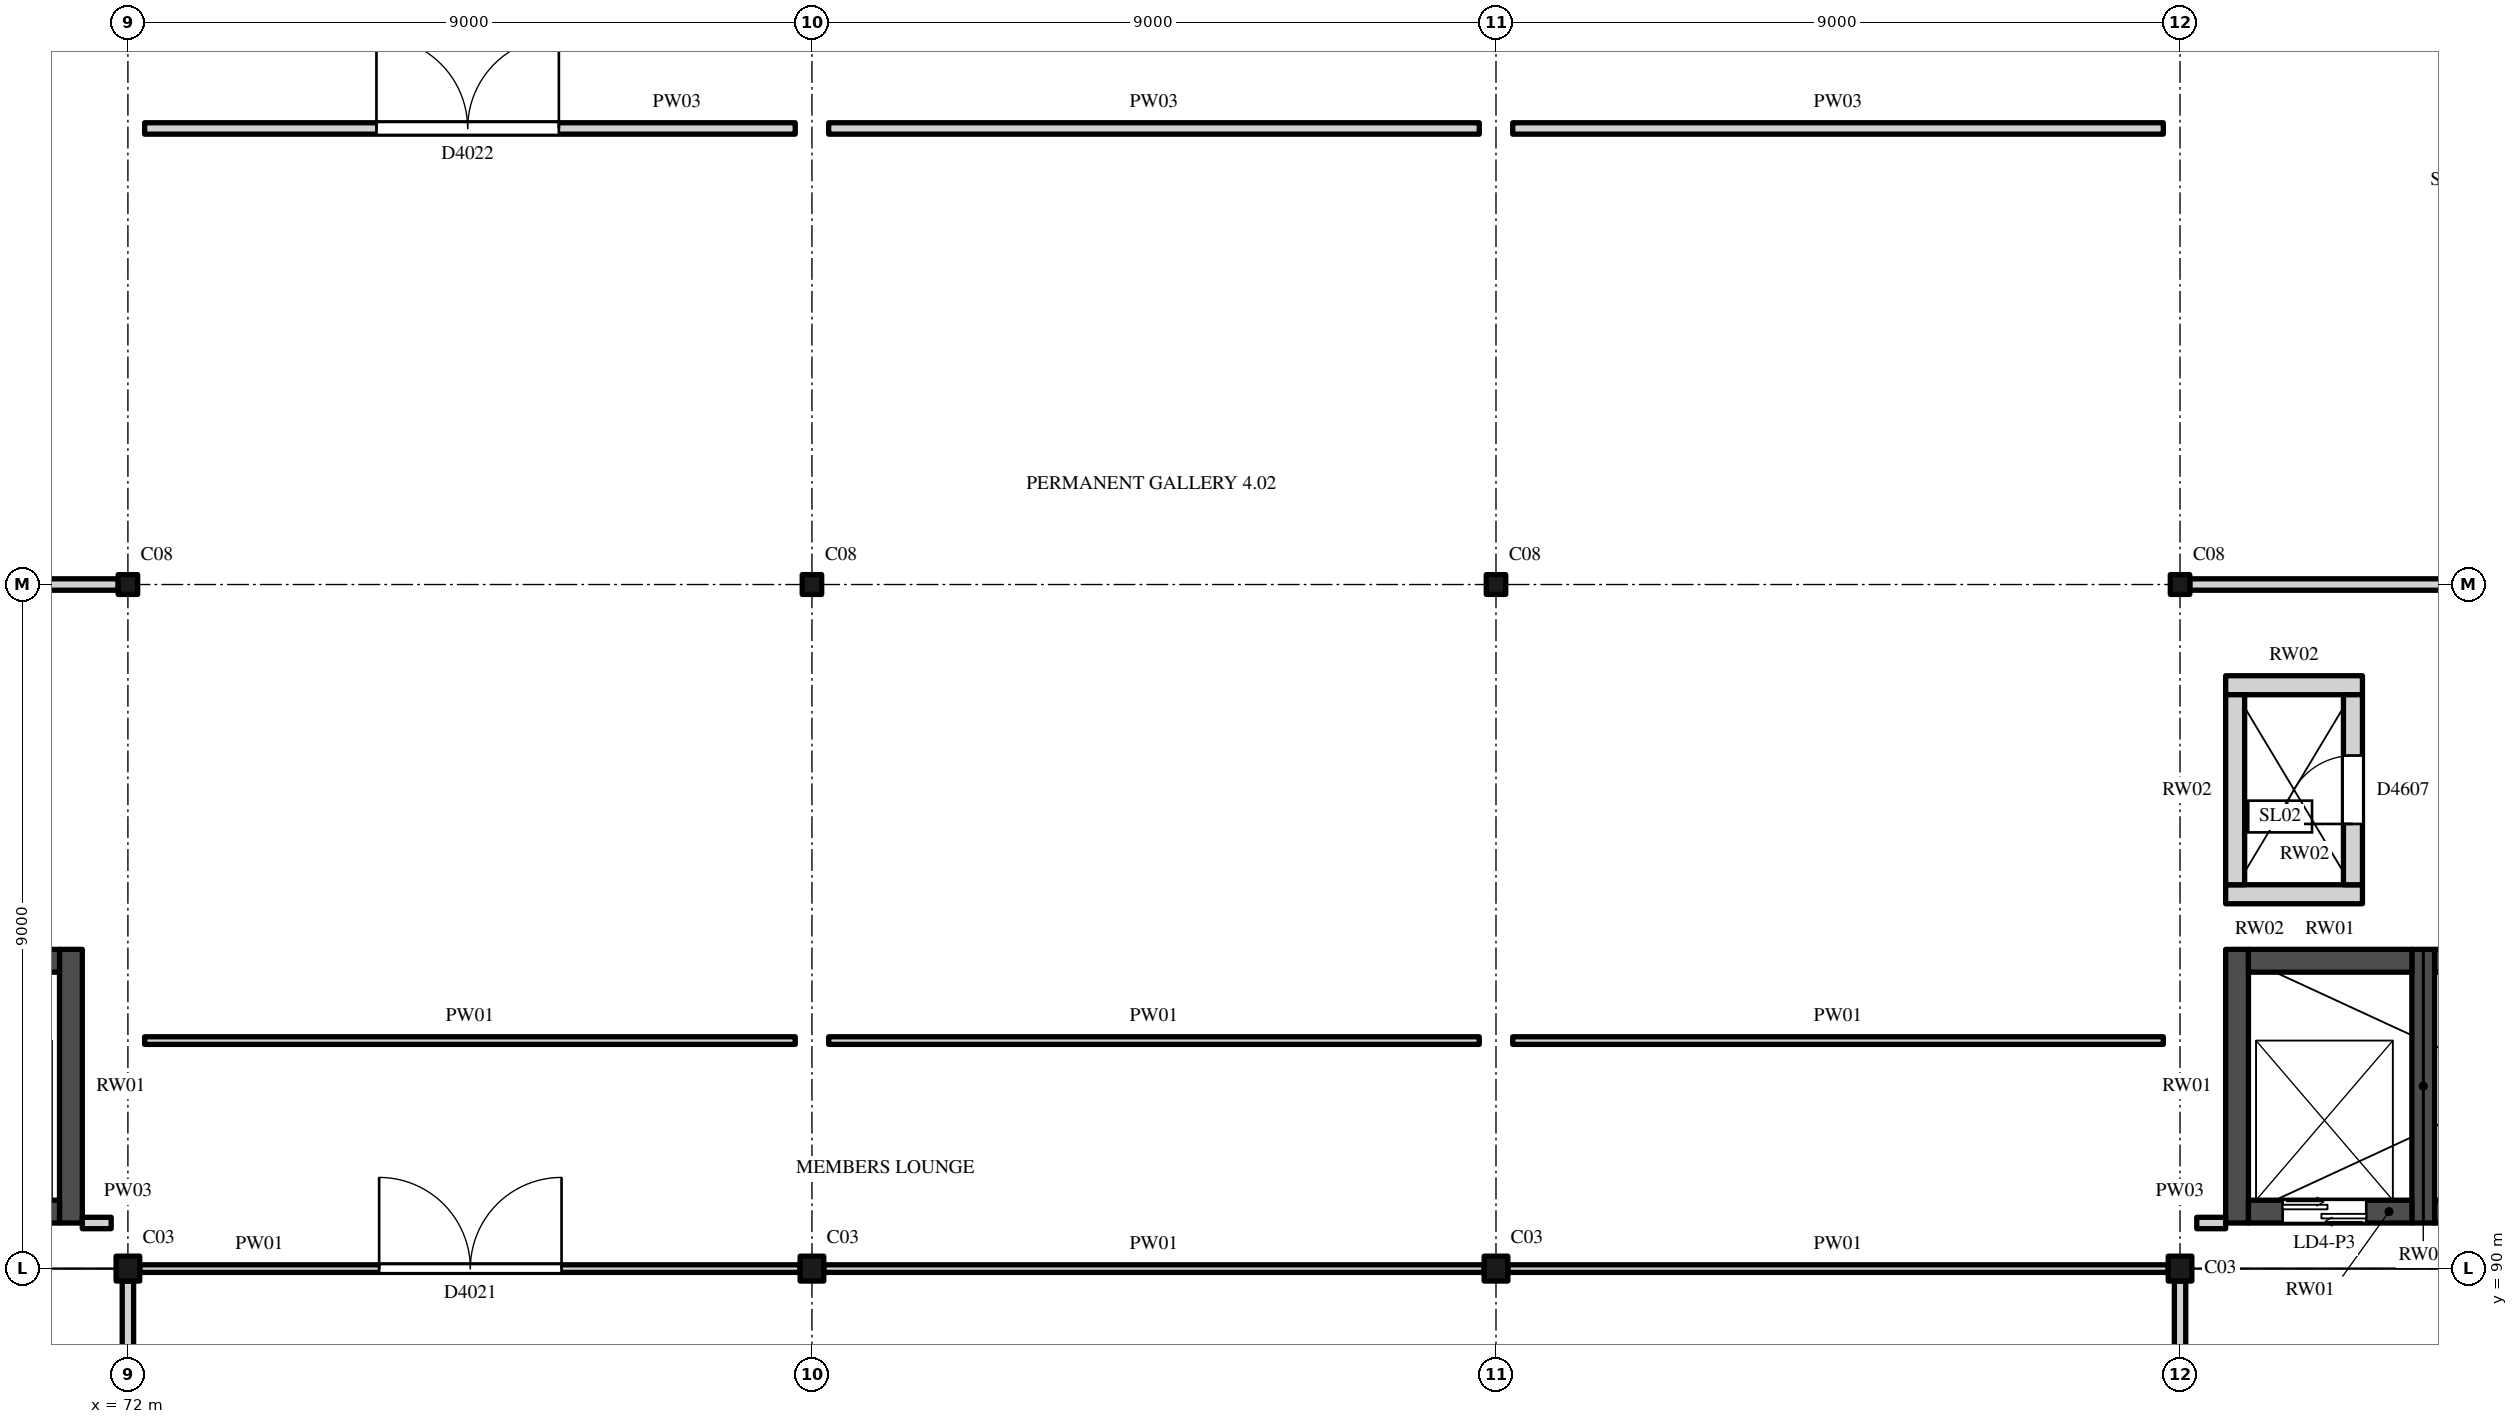
"""IFC4 building model, lengths in metres.
Left out: names, types, materials, properties, quantities, classifications, styles, units other than length and angle.
Written with IfcOpenShell. Run it as: python <this file> out.ifc"""

import sys

from ifc_helpers import new_model, si_unit, direction, frame, frame_2d, origin, origin_2d, place, context, subcontext, project, spatial, rectangle, i_section, extrude, element, fill, save


model = new_model("IFC4")
c1 = context("Model", 3, precision=1e-05, world=origin(), true_north=direction((0.0, 1.0)))
c2 = subcontext(c1, "Body", "Model", "MODEL_VIEW")
j1 = project(units=[si_unit("LENGTHUNIT", "METRE"), si_unit("PLANEANGLEUNIT", "RADIAN")], contexts=[c1])
p1 = place(None, origin())
s1 = spatial("IfcSite", under=j1, at=p1, CompositionType="ELEMENT")
p2 = place(p1, origin())
s2 = spatial("IfcBuilding", under=s1, at=p2, CompositionType="ELEMENT")
p3 = place(p2, frame((0.0, 0.0, 26.0)))
s3 = spatial("IfcBuildingStorey", under=s2, at=p3, CompositionType="ELEMENT", Elevation=26.0)
for number, where, z_axis, x_axis in (
    (1, (72.0, 90.0, 0.0), (0.0, 0.0, 1.0), (1.0, 0.0, 0.0)),
    (2, (81.0, 90.0, 0.0), (0.0, 0.0, 1.0), (1.0, 0.0, 0.0)),
    (3, (90.0, 90.0, 0.0), (0.0, 0.0, 1.0), (1.0, 0.0, 0.0)),
    (4, (99.0, 90.0, 0.0), (0.0, 0.0, 1.0), (1.0, 0.0, 0.0)),
):
    element("IfcColumn", number, at=place(p3, frame(where, z_axis=z_axis, x_axis=x_axis)), inside=s3, PredefinedType="COLUMN", context=c2, shape_type="SweptSolid", body=[
        extrude(i_section(OverallWidth=0.311, OverallDepth=0.327, WebThickness=0.016, FlangeThickness=0.025, FilletRadius=0.017, at=origin_2d()), origin(), (0.0, 0.0, 1.0), 5.0),
    ])
for number, where, z_axis, x_axis in (
    (5, (72.0, 99.0, 0.0), (0.0, 0.0, 1.0), (1.0, 0.0, 0.0)),
    (6, (81.0, 99.0, 0.0), (0.0, 0.0, 1.0), (1.0, 0.0, 0.0)),
    (7, (90.0, 99.0, 0.0), (0.0, 0.0, 1.0), (1.0, 0.0, 0.0)),
    (8, (99.0, 99.0, 0.0), (0.0, 0.0, 1.0), (1.0, 0.0, 0.0)),
):
    element("IfcColumn", number, at=place(p3, frame(where, z_axis=z_axis, x_axis=x_axis)), inside=s3, PredefinedType="COLUMN", context=c2, shape_type="SweptSolid", body=[
        extrude(i_section(OverallWidth=0.256, OverallDepth=0.26, WebThickness=0.01, FlangeThickness=0.017, FilletRadius=0.014, at=origin_2d()), origin(), (0.0, 0.0, 1.0), 5.0),
    ])
p4 = place(p3, frame((71.25, 90.6, 0.0), z_axis=(0.0, 0.0, 1.0), x_axis=(0.0, 1.0, 0.0)))
e9 = element("IfcWall", 9, at=p4, inside=s3, PredefinedType="SHEAR", context=c2, shape_type="SweptSolid", body=[
    extrude(rectangle(XDim=3.6, YDim=0.3, at=frame_2d((1.8, 0.0))), origin(), (0.0, 0.0, 1.0), 5.0),
])
p5 = place(p3, frame((68.95, 90.75, 0.0), z_axis=(0.0, 0.0, 1.0), x_axis=(1.0, 0.0, 0.0)))
e10 = element("IfcWall", 10, at=p5, inside=s3, PredefinedType="SHEAR", context=c2, shape_type="SweptSolid", body=[
    extrude(rectangle(XDim=2.15, YDim=0.3, at=frame_2d((1.075, 0.0))), origin(), (0.0, 0.0, 1.0), 5.0),
])
p6 = place(p5, frame((0.6, 0.0, 0.0)))
e11 = element("IfcOpeningElement", 11, at=p6, cuts=e10, PredefinedType="OPENING", context=c2, shape_type="SweptSolid", body=[
    extrude(rectangle(XDim=1.1, YDim=2.1, at=frame_2d((0.55, 1.05))), frame((0.0, 0.16, 0.0), z_axis=(0.0, -1.0, 0.0), x_axis=(1.0, 0.0, 0.0)), (0.0, 0.0, 1.0), 0.32),
])
p7 = place(p3, frame((68.95, 94.05, 0.0), z_axis=(0.0, 0.0, 1.0), x_axis=(1.0, 0.0, 0.0)))
e12 = element("IfcWall", 12, at=p7, inside=s3, PredefinedType="SHEAR", context=c2, shape_type="SweptSolid", body=[
    extrude(rectangle(XDim=2.15, YDim=0.3, at=frame_2d((1.075, 0.0))), origin(), (0.0, 0.0, 1.0), 5.0),
])
for number, where, z_axis, x_axis in (
    (13, (99.75, 90.6, 0.0), (0.0, 0.0, 1.0), (0.0, 1.0, 0.0)),
    (14, (102.2, 90.6, 0.0), (0.0, 0.0, 1.0), (0.0, 1.0, 0.0)),
):
    element("IfcWall", number, at=place(p3, frame(where, z_axis=z_axis, x_axis=x_axis)), inside=s3, PredefinedType="SHEAR", context=c2, shape_type="SweptSolid", body=[
        extrude(rectangle(XDim=3.6, YDim=0.3, at=frame_2d((1.8, 0.0))), origin(), (0.0, 0.0, 1.0), 5.0),
    ])
p8 = place(p3, frame((99.9, 90.75, 0.0), z_axis=(0.0, 0.0, 1.0), x_axis=(1.0, 0.0, 0.0)))
e15 = element("IfcWall", 15, at=p8, inside=s3, PredefinedType="SHEAR", context=c2, shape_type="SweptSolid", body=[
    extrude(rectangle(XDim=2.15, YDim=0.3, at=frame_2d((1.075, 0.0))), origin(), (0.0, 0.0, 1.0), 5.0),
])
p9 = place(p8, frame((0.45, 0.0, 0.0)))
e16 = element("IfcOpeningElement", 16, at=p9, cuts=e15, PredefinedType="OPENING", context=c2, shape_type="SweptSolid", body=[
    extrude(rectangle(XDim=1.1, YDim=2.1, at=frame_2d((0.55, 1.05))), frame((0.0, 0.16, 0.0), z_axis=(0.0, -1.0, 0.0), x_axis=(1.0, 0.0, 0.0)), (0.0, 0.0, 1.0), 0.32),
])
p10 = place(p3, frame((99.9, 94.05, 0.0), z_axis=(0.0, 0.0, 1.0), x_axis=(1.0, 0.0, 0.0)))
e17 = element("IfcWall", 17, at=p10, inside=s3, PredefinedType="SHEAR", context=c2, shape_type="SweptSolid", body=[
    extrude(rectangle(XDim=2.15, YDim=0.3, at=frame_2d((1.075, 0.0))), origin(), (0.0, 0.0, 1.0), 5.0),
])
p11 = place(p3, frame((102.35, 90.75, 0.0), z_axis=(0.0, 0.0, 1.0), x_axis=(1.0, 0.0, 0.0)))
e18 = element("IfcWall", 18, at=p11, inside=s3, PredefinedType="SHEAR", context=c2, shape_type="SweptSolid", body=[
    extrude(rectangle(XDim=2.3, YDim=0.3, at=frame_2d((1.15, 0.0))), origin(), (0.0, 0.0, 1.0), 5.0),
])
p12 = place(p11, frame((0.6, 0.0, 0.0)))
e19 = element("IfcOpeningElement", 19, at=p12, cuts=e18, PredefinedType="OPENING", context=c2, shape_type="SweptSolid", body=[
    extrude(rectangle(XDim=1.1, YDim=2.1, at=frame_2d((0.55, 1.05))), frame((0.0, 0.16, 0.0), z_axis=(0.0, -1.0, 0.0), x_axis=(1.0, 0.0, 0.0)), (0.0, 0.0, 1.0), 0.32),
])
p13 = place(p3, frame((102.35, 94.05, 0.0), z_axis=(0.0, 0.0, 1.0), x_axis=(1.0, 0.0, 0.0)))
e20 = element("IfcWall", 20, at=p13, inside=s3, PredefinedType="SHEAR", context=c2, shape_type="SweptSolid", body=[
    extrude(rectangle(XDim=2.3, YDim=0.3, at=frame_2d((1.15, 0.0))), origin(), (0.0, 0.0, 1.0), 5.0),
])
for number, where, z_axis, x_axis in (
    (21, (99.6, 94.925, 0.0), (0.0, 0.0, 1.0), (1.0, 0.0, 0.0)),
    (22, (99.6, 97.675, 0.0), (0.0, 0.0, 1.0), (1.0, 0.0, 0.0)),
):
    element("IfcWall", number, at=place(p3, frame(where, z_axis=z_axis, x_axis=x_axis)), inside=s3, PredefinedType="STANDARD", context=c2, shape_type="SweptSolid", body=[
        extrude(rectangle(XDim=1.8, YDim=0.25, at=frame_2d((0.9, 0.0))), origin(), (0.0, 0.0, 1.0), 5.0),
    ])
p14 = place(p3, frame((99.725, 95.05, 0.0), z_axis=(0.0, 0.0, 1.0), x_axis=(0.0, 1.0, 0.0)))
e23 = element("IfcWall", 23, at=p14, inside=s3, PredefinedType="STANDARD", context=c2, shape_type="SweptSolid", body=[
    extrude(rectangle(XDim=2.5, YDim=0.25, at=frame_2d((1.25, 0.0))), origin(), (0.0, 0.0, 1.0), 5.0),
])
p15 = place(p3, frame((101.275, 95.05, 0.0), z_axis=(0.0, 0.0, 1.0), x_axis=(0.0, 1.0, 0.0)))
e24 = element("IfcWall", 24, at=p15, inside=s3, PredefinedType="STANDARD", context=c2, shape_type="SweptSolid", body=[
    extrude(rectangle(XDim=2.5, YDim=0.25, at=frame_2d((1.25, 0.0))), origin(), (0.0, 0.0, 1.0), 5.0),
])
p16 = place(p15, frame((0.8, 0.0, 0.0)))
e25 = element("IfcOpeningElement", 25, at=p16, cuts=e24, PredefinedType="OPENING", context=c2, shape_type="SweptSolid", body=[
    extrude(rectangle(XDim=0.9, YDim=2.1, at=frame_2d((0.45, 1.05))), frame((0.0, 0.135, 0.0), z_axis=(0.0, -1.0, 0.0), x_axis=(1.0, 0.0, 0.0)), (0.0, 0.0, 1.0), 0.27),
])
p17 = place(p3, frame((72.156, 90.0, 0.0), z_axis=(0.0, 0.0, 1.0), x_axis=(1.0, 0.0, 0.0)))
e26 = element("IfcWall", 26, at=p17, inside=s3, PredefinedType="PARTITIONING", context=c2, shape_type="SweptSolid", body=[
    extrude(rectangle(XDim=8.689, YDim=0.1, at=frame_2d((4.344, 0.0))), origin(), (0.0, 0.0, 1.0), 4.518),
])
p18 = place(p17, frame((3.15, 0.0, 0.0)))
e27 = element("IfcOpeningElement", 27, at=p18, cuts=e26, PredefinedType="OPENING", context=c2, shape_type="SweptSolid", body=[
    extrude(rectangle(XDim=2.4, YDim=2.4, at=frame_2d((1.2, 1.2))), frame((0.0, 0.06, 0.0), z_axis=(0.0, -1.0, 0.0), x_axis=(1.0, 0.0, 0.0)), (0.0, 0.0, 1.0), 0.12),
])
for number, where, z_axis, x_axis in (
    (28, (81.156, 90.0, 0.0), (0.0, 0.0, 1.0), (1.0, 0.0, 0.0)),
    (29, (90.156, 90.0, 0.0), (0.0, 0.0, 1.0), (1.0, 0.0, 0.0)),
):
    element("IfcWall", number, at=place(p3, frame(where, z_axis=z_axis, x_axis=x_axis)), inside=s3, PredefinedType="PARTITIONING", context=c2, shape_type="SweptSolid", body=[
        extrude(rectangle(XDim=8.689, YDim=0.1, at=frame_2d((4.344, 0.0))), origin(), (0.0, 0.0, 1.0), 4.518),
    ])
for number, where, z_axis, x_axis in (
    (30, (71.4, 90.6, 0.0), (0.0, 0.0, 1.0), (1.0, 0.0, 0.0)),
    (31, (99.22, 90.6, 0.0), (0.0, 0.0, 1.0), (1.0, 0.0, 0.0)),
):
    element("IfcWall", number, at=place(p3, frame(where, z_axis=z_axis, x_axis=x_axis)), inside=s3, PredefinedType="PARTITIONING", context=c2, shape_type="SweptSolid", body=[
        extrude(rectangle(XDim=0.38, YDim=0.15, at=frame_2d((0.19, 0.0))), origin(), (0.0, 0.0, 1.0), 4.825),
    ])
for number, where, z_axis, x_axis in (
    (32, (72.22, 93.0, 0.0), (0.0, 0.0, 1.0), (1.0, 0.0, 0.0)),
    (33, (81.22, 93.0, 0.0), (0.0, 0.0, 1.0), (1.0, 0.0, 0.0)),
    (34, (90.22, 93.0, 0.0), (0.0, 0.0, 1.0), (1.0, 0.0, 0.0)),
):
    element("IfcWall", number, at=place(p3, frame(where, z_axis=z_axis, x_axis=x_axis)), inside=s3, PredefinedType="PARTITIONING", context=c2, shape_type="SweptSolid", body=[
        extrude(rectangle(XDim=8.56, YDim=0.1, at=frame_2d((4.28, 0.0))), origin(), (0.0, 0.0, 1.0), 4.521),
    ])
p19 = place(p3, frame((63.128, 99.0, 0.0), z_axis=(0.0, 0.0, 1.0), x_axis=(1.0, 0.0, 0.0)))
e35 = element("IfcWall", 35, at=p19, inside=s3, PredefinedType="PARTITIONING", context=c2, shape_type="SweptSolid", body=[
    extrude(rectangle(XDim=8.744, YDim=0.15, at=frame_2d((4.372, 0.0))), origin(), (0.0, 0.0, 1.0), 4.518),
])
p20 = place(p19, frame((3.85, 0.0, 0.0)))
e36 = element("IfcOpeningElement", 36, at=p20, cuts=e35, PredefinedType="OPENING", context=c2, shape_type="SweptSolid", body=[
    extrude(rectangle(XDim=1.0, YDim=2.4, at=frame_2d((0.5, 1.2))), frame((0.0, 0.085, 0.0), z_axis=(0.0, -1.0, 0.0), x_axis=(1.0, 0.0, 0.0)), (0.0, 0.0, 1.0), 0.17),
])
p21 = place(p3, frame((99.128, 99.0, 0.0), z_axis=(0.0, 0.0, 1.0), x_axis=(1.0, 0.0, 0.0)))
e37 = element("IfcWall", 37, at=p21, inside=s3, PredefinedType="PARTITIONING", context=c2, shape_type="SweptSolid", body=[
    extrude(rectangle(XDim=8.744, YDim=0.15, at=frame_2d((4.372, 0.0))), origin(), (0.0, 0.0, 1.0), 4.518),
])
p22 = place(p21, frame((3.85, 0.0, 0.0)))
e38 = element("IfcOpeningElement", 38, at=p22, cuts=e37, PredefinedType="OPENING", context=c2, shape_type="SweptSolid", body=[
    extrude(rectangle(XDim=1.0, YDim=2.4, at=frame_2d((0.5, 1.2))), frame((0.0, 0.085, 0.0), z_axis=(0.0, -1.0, 0.0), x_axis=(1.0, 0.0, 0.0)), (0.0, 0.0, 1.0), 0.17),
])
p23 = place(p3, frame((72.22, 105.0, 0.0), z_axis=(0.0, 0.0, 1.0), x_axis=(1.0, 0.0, 0.0)))
e39 = element("IfcWall", 39, at=p23, inside=s3, PredefinedType="PARTITIONING", context=c2, shape_type="SweptSolid", body=[
    extrude(rectangle(XDim=8.56, YDim=0.15, at=frame_2d((4.28, 0.0))), origin(), (0.0, 0.0, 1.0), 4.521),
])
p24 = place(p23, frame((3.05, 0.0, 0.0)))
e40 = element("IfcOpeningElement", 40, at=p24, cuts=e39, PredefinedType="OPENING", context=c2, shape_type="SweptSolid", body=[
    extrude(rectangle(XDim=2.4, YDim=3.0, at=frame_2d((1.2, 1.5))), frame((0.0, 0.085, 0.0), z_axis=(0.0, -1.0, 0.0), x_axis=(1.0, 0.0, 0.0)), (0.0, 0.0, 1.0), 0.17),
])
for number, where, z_axis, x_axis in (
    (41, (81.22, 105.0, 0.0), (0.0, 0.0, 1.0), (1.0, 0.0, 0.0)),
    (42, (90.22, 105.0, 0.0), (0.0, 0.0, 1.0), (1.0, 0.0, 0.0)),
):
    element("IfcWall", number, at=place(p3, frame(where, z_axis=z_axis, x_axis=x_axis)), inside=s3, PredefinedType="PARTITIONING", context=c2, shape_type="SweptSolid", body=[
        extrude(rectangle(XDim=8.56, YDim=0.15, at=frame_2d((4.28, 0.0))), origin(), (0.0, 0.0, 1.0), 4.521),
    ])
for number, where, z_axis, x_axis in (
    (43, (72.0, 84.075, 0.0), (0.0, 0.0, 1.0), (0.0, 1.0, 0.0)),
    (44, (99.0, 84.075, 0.0), (0.0, 0.0, 1.0), (0.0, 1.0, 0.0)),
):
    element("IfcWall", number, at=place(p3, frame(where, z_axis=z_axis, x_axis=x_axis)), inside=s3, PredefinedType="PARTITIONING", context=c2, shape_type="SweptSolid", body=[
        extrude(rectangle(XDim=5.761, YDim=0.15, at=frame_2d((2.881, 0.0))), origin(), (0.0, 0.0, 1.0), 4.419),
    ])
p25 = place(p9, origin())
e45 = element("IfcDoor", 45, at=p25, inside=s3, OperationType="DOUBLE_DOOR_SLIDING", PredefinedType="DOOR", context=c2, shape_type="SweptSolid", body=[
    extrude(rectangle(XDim=1.1, YDim=2.1, at=frame_2d((0.55, 1.05))), frame((0.0, 0.025, 0.0), z_axis=(0.0, -1.0, 0.0), x_axis=(1.0, 0.0, 0.0)), (0.0, 0.0, 1.0), 0.05),
])
fill(e16, e45)
p26 = place(p16, origin())
e46 = element("IfcDoor", 46, at=p26, inside=s3, OperationType="SINGLE_SWING_RIGHT", PredefinedType="DOOR", context=c2, shape_type="SweptSolid", body=[
    extrude(rectangle(XDim=0.9, YDim=2.1, at=frame_2d((0.45, 1.05))), frame((0.0, 0.025, 0.0), z_axis=(0.0, -1.0, 0.0), x_axis=(1.0, 0.0, 0.0)), (0.0, 0.0, 1.0), 0.05),
])
fill(e25, e46)
p27 = place(p18, origin())
e47 = element("IfcDoor", 47, at=p27, inside=s3, OperationType="DOUBLE_DOOR_SINGLE_SWING", PredefinedType="DOOR", context=c2, shape_type="SweptSolid", body=[
    extrude(rectangle(XDim=2.4, YDim=2.4, at=frame_2d((1.2, 1.2))), frame((0.0, 0.025, 0.0), z_axis=(0.0, -1.0, 0.0), x_axis=(1.0, 0.0, 0.0)), (0.0, 0.0, 1.0), 0.05),
])
fill(e27, e47)
p28 = place(p24, origin())
e48 = element("IfcDoor", 48, at=p28, inside=s3, OperationType="DOUBLE_DOOR_SINGLE_SWING", PredefinedType="DOOR", context=c2, shape_type="SweptSolid", body=[
    extrude(rectangle(XDim=2.4, YDim=3.0, at=frame_2d((1.2, 1.5))), frame((0.0, 0.025, 0.0), z_axis=(0.0, -1.0, 0.0), x_axis=(1.0, 0.0, 0.0)), (0.0, 0.0, 1.0), 0.05),
])
fill(e40, e48)
save(model, sys.argv[1])
